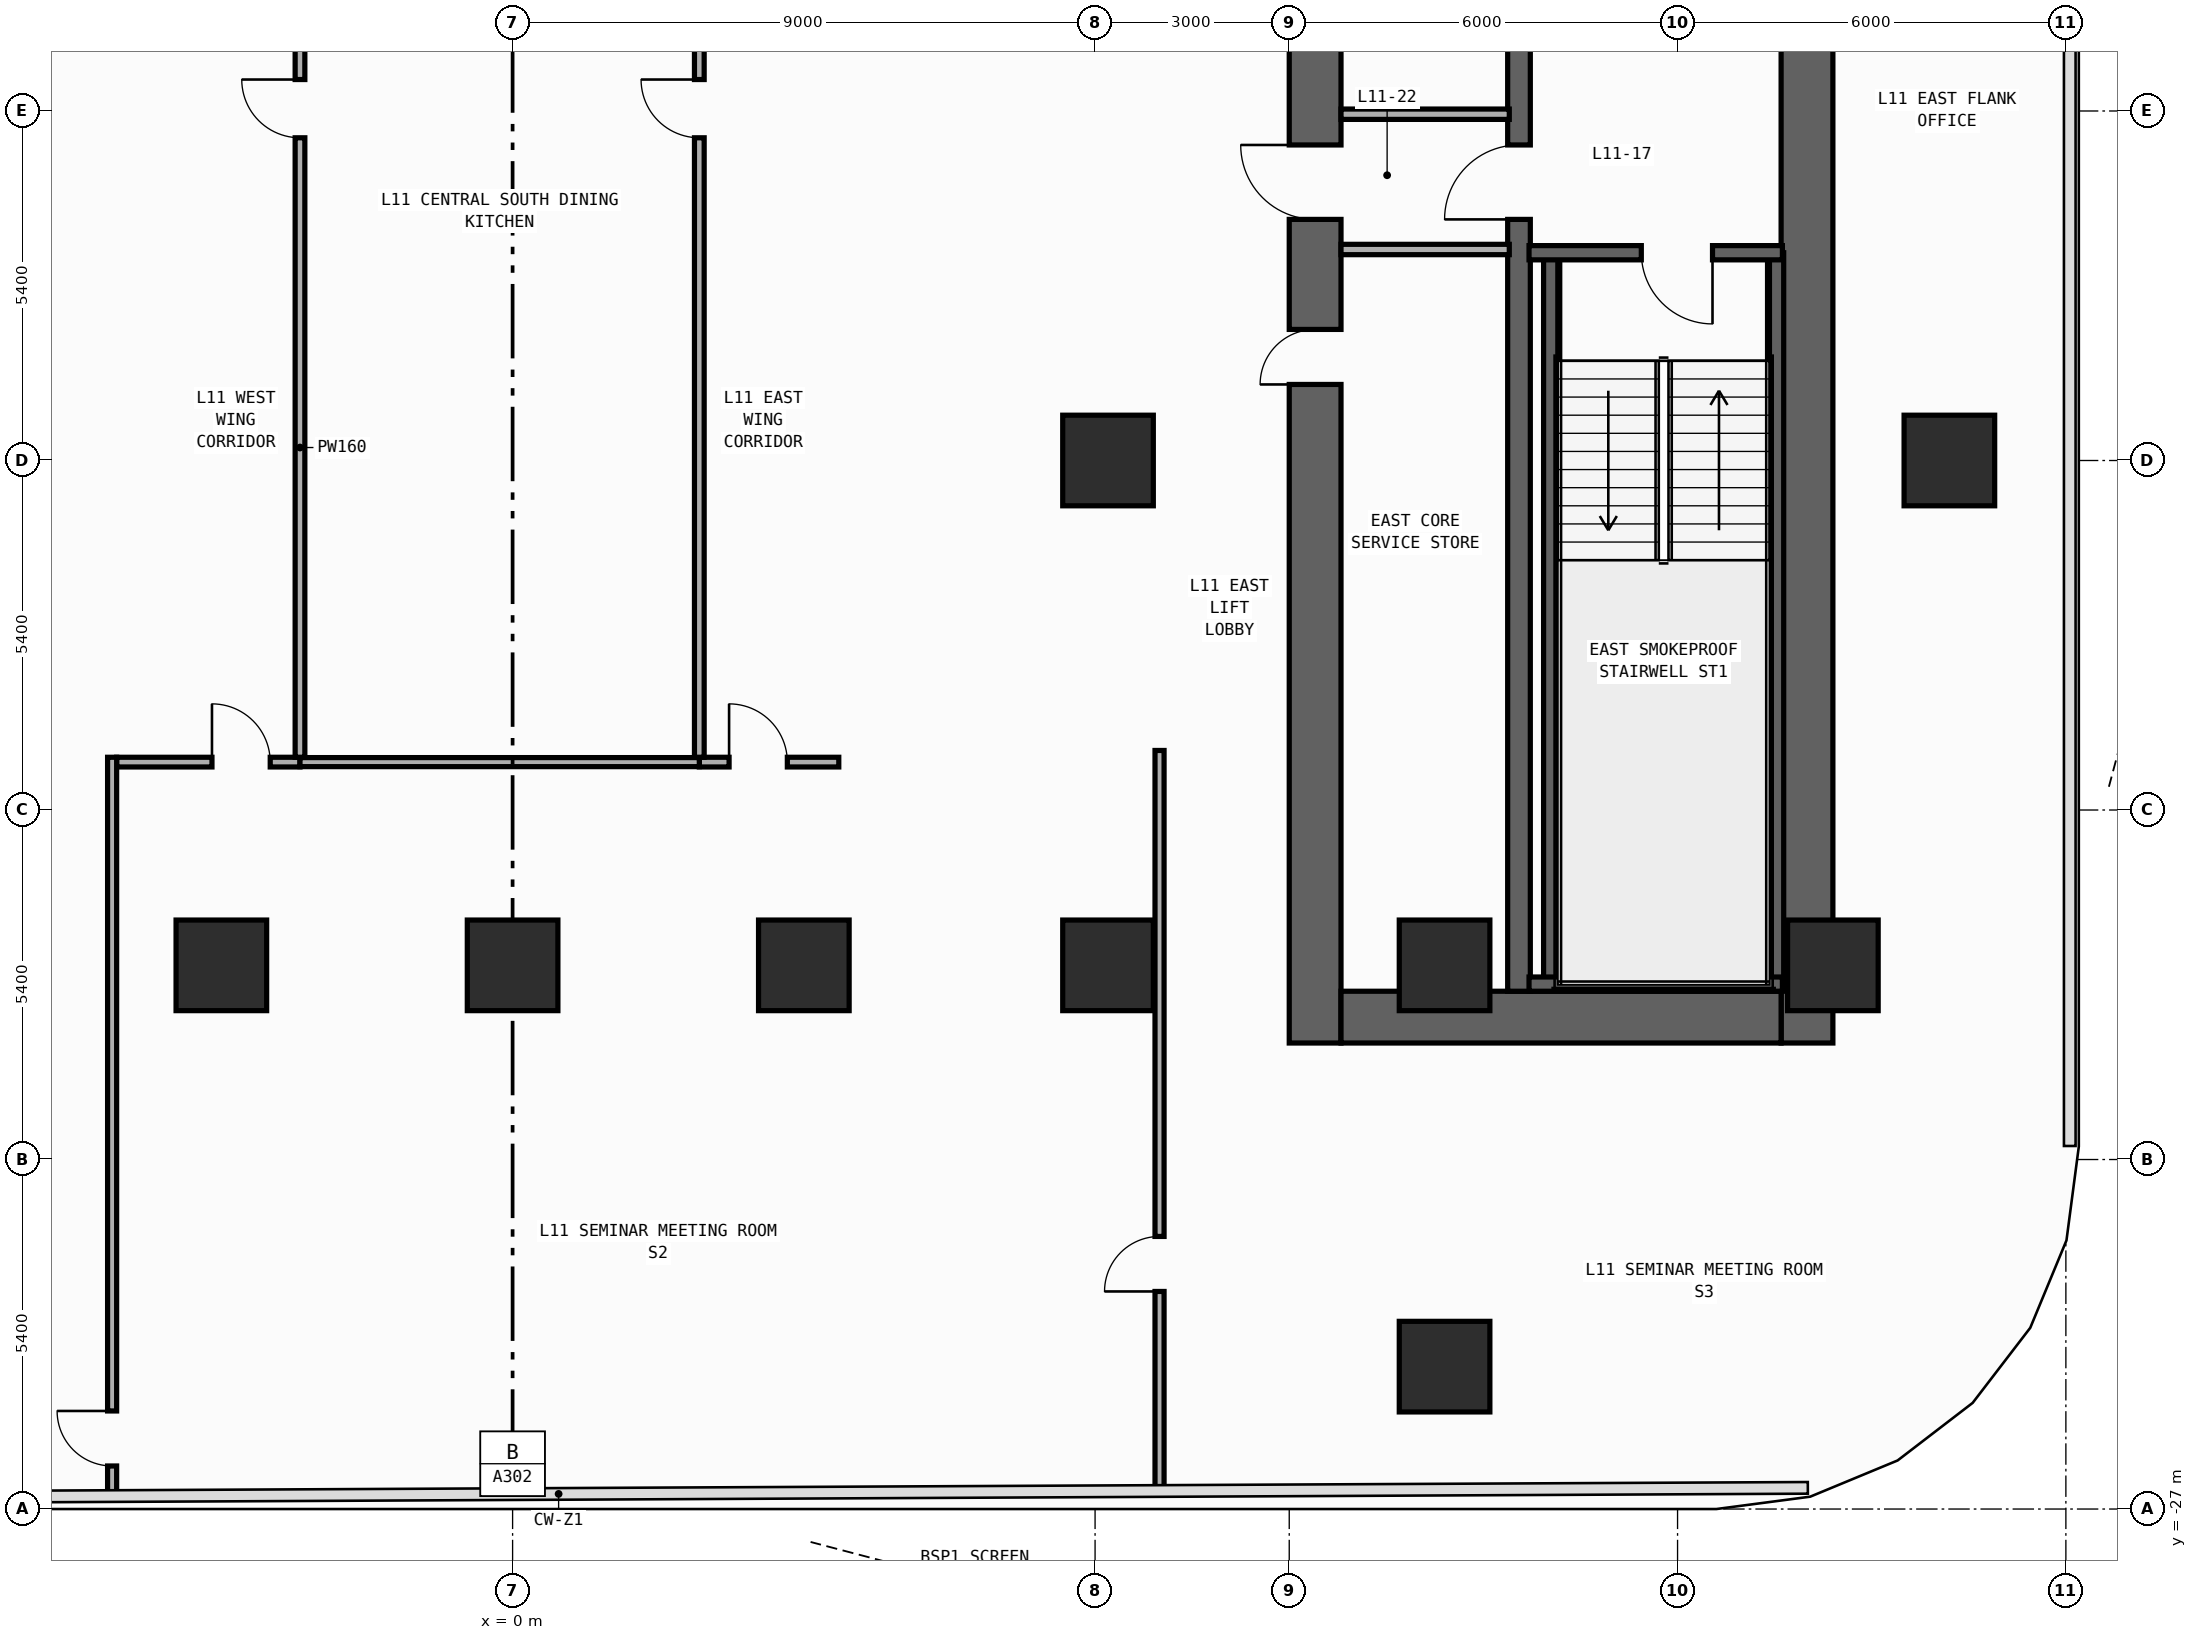
"""IFC4 building model, lengths in metres.
Left out: names, types, materials, properties, quantities, classifications, styles, units other than length and angle.
Written with IfcOpenShell. Run it as: python <this file> out.ifc"""

import sys

from ifc_helpers import new_model, si_unit, direction, frame, frame_2d, origin, origin_2d, place, context, subcontext, project, spatial, rectangle, extrude, element, fill, save


model = new_model("IFC4")
c1 = context("Model", 3, precision=1e-05, world=origin(), true_north=direction((0.0, 1.0)))
c2 = subcontext(c1, "Body", "Model", "MODEL_VIEW")
j1 = project(units=[si_unit("LENGTHUNIT", "METRE"), si_unit("PLANEANGLEUNIT", "RADIAN")], contexts=[c1])
p1 = place(None, origin())
s1 = spatial("IfcSite", under=j1, at=p1, CompositionType="ELEMENT")
p2 = place(p1, origin())
s2 = spatial("IfcBuilding", under=s1, at=p2, CompositionType="ELEMENT")
p3 = place(p2, frame((0.0, 0.0, 47.0)))
s3 = spatial("IfcBuildingStorey", under=s2, at=p3, CompositionType="ELEMENT", Elevation=47.0)
p4 = place(p3, frame((12.4, -19.8, 0.0), z_axis=(0.0, 0.0, 1.0), x_axis=(0.0, 1.0, 0.0)))
e1 = element("IfcWall", 1, at=p4, inside=s3, PredefinedType="SHEAR", context=c2, shape_type="SweptSolid", body=[
    extrude(rectangle(XDim=27.0, YDim=0.8, at=frame_2d((13.5, 0.0))), origin(), (0.0, 0.0, 1.0), 3.94),
])
p5 = place(p4, frame((23.05, 0.0, 0.0)))
e2 = element("IfcOpeningElement", 2, at=p5, cuts=e1, PredefinedType="OPENING", context=c2, shape_type="SweptSolid", body=[
    extrude(rectangle(XDim=1.1, YDim=2.2, at=frame_2d((0.55, 1.1))), frame((0.0, 0.41, 0.0), z_axis=(0.0, -1.0, 0.0), x_axis=(1.0, 0.0, 0.0)), (0.0, 0.0, 1.0), 0.82),
])
p6 = place(p4, frame((19.85, 0.0, 0.0)))
e3 = element("IfcOpeningElement", 3, at=p6, cuts=e1, PredefinedType="OPENING", context=c2, shape_type="SweptSolid", body=[
    extrude(rectangle(XDim=1.1, YDim=2.2, at=frame_2d((0.55, 1.1))), frame((0.0, 0.41, 0.0), z_axis=(0.0, -1.0, 0.0), x_axis=(1.0, 0.0, 0.0)), (0.0, 0.0, 1.0), 0.82),
])
p7 = place(p4, frame((16.65, 0.0, 0.0)))
e4 = element("IfcOpeningElement", 4, at=p7, cuts=e1, PredefinedType="OPENING", context=c2, shape_type="SweptSolid", body=[
    extrude(rectangle(XDim=1.1, YDim=2.2, at=frame_2d((0.55, 1.1))), frame((0.0, 0.41, 0.0), z_axis=(0.0, -1.0, 0.0), x_axis=(1.0, 0.0, 0.0)), (0.0, 0.0, 1.0), 0.82),
])
p8 = place(p4, frame((10.175, 0.0, 0.0)))
e5 = element("IfcOpeningElement", 5, at=p8, cuts=e1, PredefinedType="OPENING", context=c2, shape_type="SweptSolid", body=[
    extrude(rectangle(XDim=0.85, YDim=2.1, at=frame_2d((0.425, 1.05))), frame((0.0, 0.41, 0.0), z_axis=(0.0, -1.0, 0.0), x_axis=(1.0, 0.0, 0.0)), (0.0, 0.0, 1.0), 0.82),
])
p9 = place(p4, frame((12.725, 0.0, 0.0)))
e6 = element("IfcOpeningElement", 6, at=p9, cuts=e1, PredefinedType="OPENING", context=c2, shape_type="SweptSolid", body=[
    extrude(rectangle(XDim=1.15, YDim=2.2, at=frame_2d((0.575, 1.1))), frame((0.0, 0.41, 0.0), z_axis=(0.0, -1.0, 0.0), x_axis=(1.0, 0.0, 0.0)), (0.0, 0.0, 1.0), 0.82),
])
p10 = place(p4, frame((25.125, 0.0, 0.0)))
e7 = element("IfcOpeningElement", 7, at=p10, cuts=e1, PredefinedType="OPENING", context=c2, shape_type="SweptSolid", body=[
    extrude(rectangle(XDim=0.85, YDim=2.1, at=frame_2d((0.425, 1.05))), frame((0.0, 0.41, 0.0), z_axis=(0.0, -1.0, 0.0), x_axis=(1.0, 0.0, 0.0)), (0.0, 0.0, 1.0), 0.82),
])
p11 = place(p3, frame((20.0, -19.8, 0.0), z_axis=(0.0, 0.0, 1.0), x_axis=(0.0, 1.0, 0.0)))
e8 = element("IfcWall", 8, at=p11, inside=s3, PredefinedType="SHEAR", context=c2, shape_type="SweptSolid", body=[
    extrude(rectangle(XDim=27.0, YDim=0.8, at=frame_2d((13.5, 0.0))), origin(), (0.0, 0.0, 1.0), 3.94),
])
p12 = place(p3, frame((12.8, -19.4, 0.0), z_axis=(0.0, 0.0, 1.0), x_axis=(1.0, 0.0, 0.0)))
e9 = element("IfcWall", 9, at=p12, inside=s3, PredefinedType="SHEAR", context=c2, shape_type="SweptSolid", body=[
    extrude(rectangle(XDim=6.8, YDim=0.8, at=frame_2d((3.4, 0.0))), origin(), (0.0, 0.0, 1.0), 3.94),
])
p13 = place(p3, frame((15.55, -19.0, 0.0), z_axis=(0.0, 0.0, 1.0), x_axis=(0.0, 1.0, 0.0)))
e10 = element("IfcWall", 10, at=p13, inside=s3, PredefinedType="SHEAR", context=c2, shape_type="SweptSolid", body=[
    extrude(rectangle(XDim=25.4, YDim=0.35, at=frame_2d((12.7, 0.0))), origin(), (0.0, 0.0, 1.0), 3.94),
])
p14 = place(p13, frame((11.925, 0.0, 0.0)))
e11 = element("IfcOpeningElement", 11, at=p14, cuts=e10, PredefinedType="OPENING", context=c2, shape_type="SweptSolid", body=[
    extrude(rectangle(XDim=1.15, YDim=2.2, at=frame_2d((0.575, 1.1))), frame((0.0, 0.185, 0.0), z_axis=(0.0, -1.0, 0.0), x_axis=(1.0, 0.0, 0.0)), (0.0, 0.0, 1.0), 0.37),
])
p15 = place(p13, frame((24.325, 0.0, 0.0)))
e12 = element("IfcOpeningElement", 12, at=p15, cuts=e10, PredefinedType="OPENING", context=c2, shape_type="SweptSolid", body=[
    extrude(rectangle(XDim=0.85, YDim=2.1, at=frame_2d((0.425, 1.05))), frame((0.0, 0.185, 0.0), z_axis=(0.0, -1.0, 0.0), x_axis=(1.0, 0.0, 0.0)), (0.0, 0.0, 1.0), 0.37),
])
for number, where, z_axis, x_axis in (
    (13, (16.04, -18.89, 0.0), (0.0, 0.0, 1.0), (0.0, 1.0, 0.0)),
    (14, (19.53, -18.89, 0.0), (0.0, 0.0, 1.0), (0.0, 1.0, 0.0)),
):
    element("IfcWall", number, at=place(p3, frame(where, z_axis=z_axis, x_axis=x_axis)), inside=s3, PredefinedType="SHEAR", context=c2, shape_type="SweptSolid", body=[
        extrude(rectangle(XDim=11.3, YDim=0.22, at=frame_2d((5.65, 0.0))), origin(), (0.0, 0.0, 1.0), 3.94),
    ])
p16 = place(p3, frame((15.705, -18.89, 0.0), z_axis=(0.0, 0.0, 1.0), x_axis=(1.0, 0.0, 0.0)))
e15 = element("IfcWall", 15, at=p16, inside=s3, PredefinedType="SHEAR", context=c2, shape_type="SweptSolid", body=[
    extrude(rectangle(XDim=3.915, YDim=0.22, at=frame_2d((1.958, 0.0))), origin(), (0.0, 0.0, 1.0), 3.94),
])
p17 = place(p3, frame((19.62, -7.59, 0.0), z_axis=(0.0, 0.0, 1.0), x_axis=(-1.0, 0.0, 0.0)))
e16 = element("IfcWall", 16, at=p17, inside=s3, PredefinedType="SHEAR", context=c2, shape_type="SweptSolid", body=[
    extrude(rectangle(XDim=3.915, YDim=0.22, at=frame_2d((1.958, 0.0))), origin(), (0.0, 0.0, 1.0), 3.94),
])
p18 = place(p17, frame((1.08, 0.0, 0.0)))
e17 = element("IfcOpeningElement", 17, at=p18, cuts=e16, PredefinedType="OPENING", context=c2, shape_type="SweptSolid", body=[
    extrude(rectangle(XDim=1.1, YDim=2.2, at=frame_2d((0.55, 1.1))), frame((0.0, 0.12, 0.0), z_axis=(0.0, -1.0, 0.0), x_axis=(1.0, 0.0, 0.0)), (0.0, 0.0, 1.0), 0.24),
])
for number, where, z_axis, x_axis in (
    (18, (9.2, -18.6, 0.0), (0.0, 0.0, 1.0), (1.0, 0.0, 0.0)),
    (19, (9.2, -10.8, 0.0), (0.0, 0.0, 1.0), (1.0, 0.0, 0.0)),
    (20, (20.4, -18.6, 0.0), (0.0, 0.0, 1.0), (1.0, 0.0, 0.0)),
    (21, (14.4, -18.6, 0.0), (0.0, 0.0, 1.0), (1.0, 0.0, 0.0)),
    (22, (-4.5, -18.6, 0.0), (0.0, 0.0, 1.0), (1.0, 0.0, 0.0)),
    (23, (0.0, -18.6, 0.0), (0.0, 0.0, 1.0), (1.0, 0.0, 0.0)),
    (24, (4.5, -18.6, 0.0), (0.0, 0.0, 1.0), (1.0, 0.0, 0.0)),
    (25, (22.2, -10.8, 0.0), (0.0, 0.0, 1.0), (1.0, 0.0, 0.0)),
    (26, (14.4, -24.8, 0.0), (0.0, 0.0, 1.0), (1.0, 0.0, 0.0)),
):
    element("IfcColumn", number, at=place(p3, frame(where, z_axis=z_axis, x_axis=x_axis)), inside=s3, PredefinedType="COLUMN", context=c2, shape_type="SweptSolid", body=[
        extrude(rectangle(XDim=1.4, YDim=1.4, at=origin_2d()), origin(), (0.0, 0.0, 1.0), 4.2),
    ])
for number, where, z_axis, x_axis in (
    (27, (12.8, -5.45, 0.0), (0.0, 0.0, 1.0), (1.0, 0.0, 0.0)),
    (28, (12.8, -7.54, 0.0), (0.0, 0.0, 1.0), (1.0, 0.0, 0.0)),
):
    element("IfcWall", number, at=place(p3, frame(where, z_axis=z_axis, x_axis=x_axis)), inside=s3, PredefinedType="STANDARD", context=c2, shape_type="SweptSolid", body=[
        extrude(rectangle(XDim=2.6, YDim=0.16, at=frame_2d((1.3, 0.0))), origin(), (0.0, 0.0, 1.0), 3.94),
    ])
p19 = place(p3, frame((-6.118, -15.46, 0.0), z_axis=(0.0, 0.0, 1.0), x_axis=(1.0, 0.0, 0.0)))
e29 = element("IfcWall", 29, at=p19, inside=s3, PredefinedType="PARTITIONING", context=c2, shape_type="SweptSolid", body=[
    extrude(rectangle(XDim=2.833, YDim=0.15, at=frame_2d((1.417, 0.0))), origin(), (0.0, 0.0, 1.0), 3.94),
])
p20 = place(p19, frame((1.473, 0.0, 0.0)))
e30 = element("IfcOpeningElement", 30, at=p20, cuts=e29, PredefinedType="OPENING", context=c2, shape_type="SweptSolid", body=[
    extrude(rectangle(XDim=0.9, YDim=2.15, at=frame_2d((0.45, 1.075))), frame((0.0, 0.085, 0.0), z_axis=(0.0, -1.0, 0.0), x_axis=(1.0, 0.0, 0.0)), (0.0, 0.0, 1.0), 0.17),
])
p21 = place(p3, frame((-3.285, -15.385, 0.0), z_axis=(0.0, 0.0, 1.0), x_axis=(0.0, 1.0, 0.0)))
e31 = element("IfcWall", 31, at=p21, inside=s3, PredefinedType="PARTITIONING", context=c2, shape_type="SweptSolid", body=[
    extrude(rectangle(XDim=17.005, YDim=0.15, at=frame_2d((8.502, 0.0))), origin(), (0.0, 0.0, 1.0), 3.94),
])
p22 = place(p21, frame((9.571, 0.0, 0.0)))
e32 = element("IfcOpeningElement", 32, at=p22, cuts=e31, PredefinedType="OPENING", context=c2, shape_type="SweptSolid", body=[
    extrude(rectangle(XDim=0.9, YDim=2.15, at=frame_2d((0.45, 1.075))), frame((0.0, 0.085, 0.0), z_axis=(0.0, -1.0, 0.0), x_axis=(1.0, 0.0, 0.0)), (0.0, 0.0, 1.0), 0.17),
])
p23 = place(p3, frame((2.885, -15.46, 0.0), z_axis=(0.0, 0.0, 1.0), x_axis=(1.0, 0.0, 0.0)))
e33 = element("IfcWall", 33, at=p23, inside=s3, PredefinedType="PARTITIONING", context=c2, shape_type="SweptSolid", body=[
    extrude(rectangle(XDim=2.155, YDim=0.15, at=frame_2d((1.078, 0.0))), origin(), (0.0, 0.0, 1.0), 3.94),
])
p24 = place(p23, frame((0.46, 0.0, 0.0)))
e34 = element("IfcOpeningElement", 34, at=p24, cuts=e33, PredefinedType="OPENING", context=c2, shape_type="SweptSolid", body=[
    extrude(rectangle(XDim=0.9, YDim=2.15, at=frame_2d((0.45, 1.075))), frame((0.0, 0.085, 0.0), z_axis=(0.0, -1.0, 0.0), x_axis=(1.0, 0.0, 0.0)), (0.0, 0.0, 1.0), 0.17),
])
p25 = place(p3, frame((2.885, -15.385, 0.0), z_axis=(0.0, 0.0, 1.0), x_axis=(0.0, 1.0, 0.0)))
e35 = element("IfcWall", 35, at=p25, inside=s3, PredefinedType="PARTITIONING", context=c2, shape_type="SweptSolid", body=[
    extrude(rectangle(XDim=17.005, YDim=0.15, at=frame_2d((8.502, 0.0))), origin(), (0.0, 0.0, 1.0), 3.94),
])
p26 = place(p25, frame((9.571, 0.0, 0.0)))
e36 = element("IfcOpeningElement", 36, at=p26, cuts=e35, PredefinedType="OPENING", context=c2, shape_type="SweptSolid", body=[
    extrude(rectangle(XDim=0.9, YDim=2.15, at=frame_2d((0.45, 1.075))), frame((0.0, 0.085, 0.0), z_axis=(0.0, -1.0, 0.0), x_axis=(1.0, 0.0, 0.0)), (0.0, 0.0, 1.0), 0.17),
])
p27 = place(p3, frame((-6.188, -26.795, 0.0), z_axis=(0.0, 0.0, 1.0), x_axis=(0.0, 1.0, 0.0)))
e37 = element("IfcWall", 37, at=p27, inside=s3, PredefinedType="PARTITIONING", context=c2, shape_type="SweptSolid", body=[
    extrude(rectangle(XDim=11.41, YDim=0.14, at=frame_2d((5.705, 0.0))), origin(), (0.0, 0.0, 1.0), 3.94),
])
p28 = place(p27, frame((0.46, 0.0, 0.0)))
e38 = element("IfcOpeningElement", 38, at=p28, cuts=e37, PredefinedType="OPENING", context=c2, shape_type="SweptSolid", body=[
    extrude(rectangle(XDim=0.85, YDim=2.1, at=frame_2d((0.425, 1.05))), frame((0.0, 0.08, 0.0), z_axis=(0.0, -1.0, 0.0), x_axis=(1.0, 0.0, 0.0)), (0.0, 0.0, 1.0), 0.16),
])
p29 = place(p3, frame((9.996, -26.716, 0.0), z_axis=(0.0, 0.0, 1.0), x_axis=(0.0, 1.0, 0.0)))
e39 = element("IfcWall", 39, at=p29, inside=s3, PredefinedType="PARTITIONING", context=c2, shape_type="SweptSolid", body=[
    extrude(rectangle(XDim=11.436, YDim=0.14, at=frame_2d((5.718, 0.0))), origin(), (0.0, 0.0, 1.0), 3.94),
])
p30 = place(p29, frame((3.078, 0.0, 0.0)))
e40 = element("IfcOpeningElement", 40, at=p30, cuts=e39, PredefinedType="OPENING", context=c2, shape_type="SweptSolid", body=[
    extrude(rectangle(XDim=0.85, YDim=2.1, at=frame_2d((0.425, 1.05))), frame((0.0, 0.08, 0.0), z_axis=(0.0, -1.0, 0.0), x_axis=(1.0, 0.0, 0.0)), (0.0, 0.0, 1.0), 0.16),
])
p31 = place(p3, frame((-3.285, -15.46, 0.0), z_axis=(0.0, 0.0, 1.0), x_axis=(1.0, 0.0, 0.0)))
e41 = element("IfcWall", 41, at=p31, inside=s3, PredefinedType="PARTITIONING", context=c2, shape_type="SweptSolid", body=[
    extrude(rectangle(XDim=6.17, YDim=0.14, at=frame_2d((3.085, 0.0))), origin(), (0.0, 0.0, 1.0), 3.94),
])
p32 = place(p18, origin())
e42 = element("IfcDoor", 42, at=p32, inside=s3, OperationType="SINGLE_SWING_LEFT", PredefinedType="DOOR", context=c2, shape_type="SweptSolid", body=[
    extrude(rectangle(XDim=1.1, YDim=2.2, at=frame_2d((0.55, 1.1))), frame((0.0, 0.025, 0.0), z_axis=(0.0, -1.0, 0.0), x_axis=(1.0, 0.0, 0.0)), (0.0, 0.0, 1.0), 0.05),
])
fill(e17, e42)
p33 = place(p8, origin())
e43 = element("IfcDoor", 43, at=p33, inside=s3, OperationType="SINGLE_SWING_LEFT", PredefinedType="DOOR", context=c2, shape_type="SweptSolid", body=[
    extrude(rectangle(XDim=0.85, YDim=2.1, at=frame_2d((0.425, 1.05))), frame((0.0, 0.025, 0.0), z_axis=(0.0, -1.0, 0.0), x_axis=(1.0, 0.0, 0.0)), (0.0, 0.0, 1.0), 0.05),
])
fill(e5, e43)
p34 = place(p9, origin())
e44 = element("IfcDoor", 44, at=p34, inside=s3, OperationType="SINGLE_SWING_RIGHT", PredefinedType="DOOR", context=c2, shape_type="SweptSolid", body=[
    extrude(rectangle(XDim=1.15, YDim=2.2, at=frame_2d((0.575, 1.1))), frame((0.0, 0.025, 0.0), z_axis=(0.0, -1.0, 0.0), x_axis=(1.0, 0.0, 0.0)), (0.0, 0.0, 1.0), 0.05),
])
fill(e6, e44)
p35 = place(p14, origin())
e45 = element("IfcDoor", 45, at=p35, inside=s3, OperationType="SINGLE_SWING_LEFT", PredefinedType="DOOR", context=c2, shape_type="SweptSolid", body=[
    extrude(rectangle(XDim=1.15, YDim=2.2, at=frame_2d((0.575, 1.1))), frame((0.0, 0.025, 0.0), z_axis=(0.0, -1.0, 0.0), x_axis=(1.0, 0.0, 0.0)), (0.0, 0.0, 1.0), 0.05),
])
fill(e11, e45)
p36 = place(p20, origin())
e46 = element("IfcDoor", 46, at=p36, inside=s3, OperationType="SINGLE_SWING_LEFT", PredefinedType="DOOR", context=c2, shape_type="SweptSolid", body=[
    extrude(rectangle(XDim=0.9, YDim=2.15, at=frame_2d((0.45, 1.075))), frame((0.0, 0.025, 0.0), z_axis=(0.0, -1.0, 0.0), x_axis=(1.0, 0.0, 0.0)), (0.0, 0.0, 1.0), 0.05),
])
fill(e30, e46)
p37 = place(p22, origin())
e47 = element("IfcDoor", 47, at=p37, inside=s3, OperationType="SINGLE_SWING_RIGHT", PredefinedType="DOOR", context=c2, shape_type="SweptSolid", body=[
    extrude(rectangle(XDim=0.9, YDim=2.15, at=frame_2d((0.45, 1.075))), frame((0.0, 0.025, 0.0), z_axis=(0.0, -1.0, 0.0), x_axis=(1.0, 0.0, 0.0)), (0.0, 0.0, 1.0), 0.05),
])
fill(e32, e47)
p38 = place(p24, origin())
e48 = element("IfcDoor", 48, at=p38, inside=s3, OperationType="SINGLE_SWING_LEFT", PredefinedType="DOOR", context=c2, shape_type="SweptSolid", body=[
    extrude(rectangle(XDim=0.9, YDim=2.15, at=frame_2d((0.45, 1.075))), frame((0.0, 0.025, 0.0), z_axis=(0.0, -1.0, 0.0), x_axis=(1.0, 0.0, 0.0)), (0.0, 0.0, 1.0), 0.05),
])
fill(e34, e48)
p39 = place(p26, origin())
e49 = element("IfcDoor", 49, at=p39, inside=s3, OperationType="SINGLE_SWING_RIGHT", PredefinedType="DOOR", context=c2, shape_type="SweptSolid", body=[
    extrude(rectangle(XDim=0.9, YDim=2.15, at=frame_2d((0.45, 1.075))), frame((0.0, 0.025, 0.0), z_axis=(0.0, -1.0, 0.0), x_axis=(1.0, 0.0, 0.0)), (0.0, 0.0, 1.0), 0.05),
])
fill(e36, e49)
p40 = place(p30, origin())
e50 = element("IfcDoor", 50, at=p40, inside=s3, OperationType="SINGLE_SWING_LEFT", PredefinedType="DOOR", context=c2, shape_type="SweptSolid", body=[
    extrude(rectangle(XDim=0.85, YDim=2.1, at=frame_2d((0.425, 1.05))), frame((0.0, 0.025, 0.0), z_axis=(0.0, -1.0, 0.0), x_axis=(1.0, 0.0, 0.0)), (0.0, 0.0, 1.0), 0.05),
])
fill(e40, e50)
p41 = place(p28, origin())
e51 = element("IfcDoor", 51, at=p41, inside=s3, OperationType="SINGLE_SWING_RIGHT", PredefinedType="DOOR", context=c2, shape_type="SweptSolid", body=[
    extrude(rectangle(XDim=0.85, YDim=2.1, at=frame_2d((0.425, 1.05))), frame((0.0, 0.025, 0.0), z_axis=(0.0, -1.0, 0.0), x_axis=(1.0, 0.0, 0.0)), (0.0, 0.0, 1.0), 0.05),
])
fill(e38, e51)
save(model, sys.argv[1])
